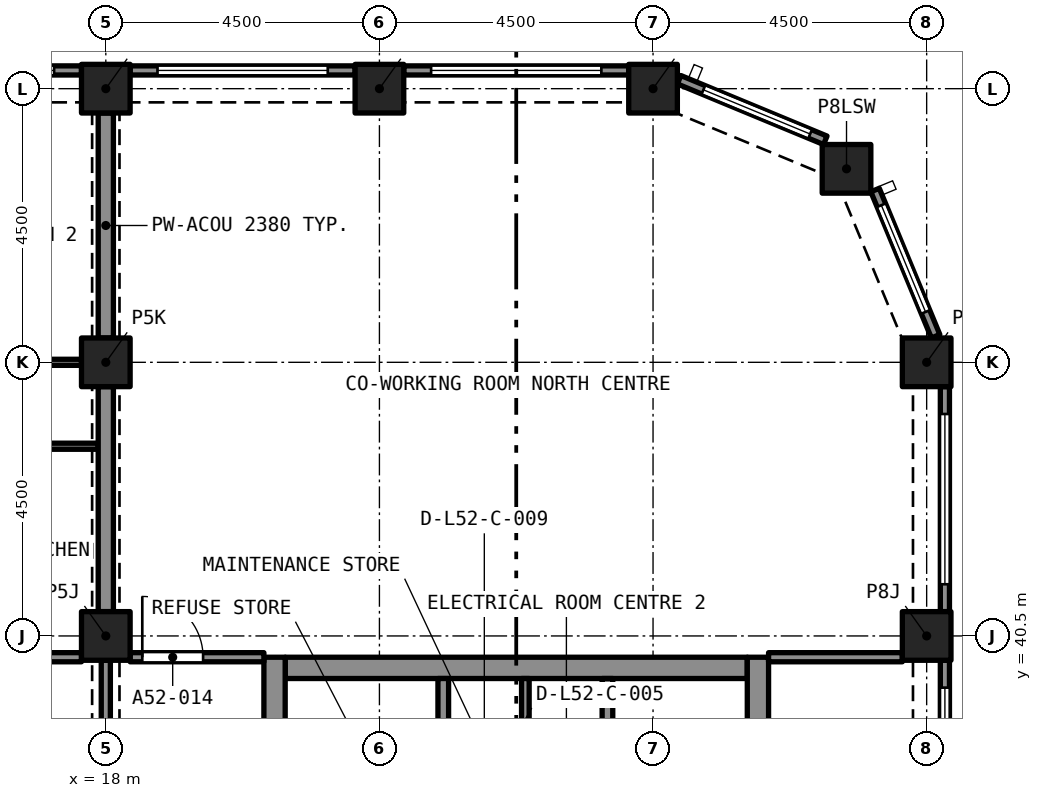
"""IFC4 building model, lengths in metres.
Left out: names, types, materials, properties, quantities, classifications, styles, units other than length and angle.
Written with IfcOpenShell. Run it as: python <this file> out.ifc"""

import sys

from ifc_helpers import new_model, si_unit, direction, frame, frame_2d, origin, origin_2d, place, context, subcontext, project, spatial, rectangle, extrude, element, fill, save


model = new_model("IFC4")
c1 = context("Model", 3, precision=1e-05, world=origin(), true_north=direction((0.0, 1.0)))
c2 = subcontext(c1, "Body", "Model", "MODEL_VIEW")
j1 = project(units=[si_unit("LENGTHUNIT", "METRE"), si_unit("PLANEANGLEUNIT", "RADIAN")], contexts=[c1])
p1 = place(None, origin())
s1 = spatial("IfcSite", under=j1, at=p1, CompositionType="ELEMENT")
p2 = place(p1, origin())
s2 = spatial("IfcBuilding", under=s1, at=p2, CompositionType="ELEMENT")
p3 = place(p2, frame((0.0, 0.0, 189.1)))
s3 = spatial("IfcBuildingStorey", under=s2, at=p3, CompositionType="ELEMENT", Elevation=189.1)
for number, where, z_axis, x_axis in (
    (1, (18.0, 40.5, 0.0), (0.0, 0.0, 1.0), (1.0, 0.0, 0.0)),
    (2, (31.5, 40.5, 0.0), (0.0, 0.0, 1.0), (1.0, 0.0, 0.0)),
    (3, (18.0, 45.0, 0.0), (0.0, 0.0, 1.0), (1.0, 0.0, 0.0)),
    (4, (31.5, 45.0, 0.0), (0.0, 0.0, 1.0), (1.0, 0.0, 0.0)),
    (5, (30.182, 48.182, 0.0), (0.0, 0.0, 1.0), (1.0, 0.0, 0.0)),
    (6, (18.0, 49.5, 0.0), (0.0, 0.0, 1.0), (1.0, 0.0, 0.0)),
    (7, (22.5, 49.5, 0.0), (0.0, 0.0, 1.0), (1.0, 0.0, 0.0)),
    (8, (27.0, 49.5, 0.0), (0.0, 0.0, 1.0), (1.0, 0.0, 0.0)),
):
    element("IfcColumn", number, at=place(p3, frame(where, z_axis=z_axis, x_axis=x_axis)), inside=s3, PredefinedType="COLUMN", context=c2, shape_type="SweptSolid", body=[
        extrude(rectangle(XDim=0.8, YDim=0.8, at=origin_2d()), origin(), (0.0, 0.0, 1.0), 3.2),
    ])
p4 = place(p3, frame((20.95, 39.975, 0.0), z_axis=(0.0, 0.0, 1.0), x_axis=(1.0, 0.0, 0.0)))
e9 = element("IfcWall", 9, at=p4, inside=s3, PredefinedType="SOLIDWALL", context=c2, shape_type="SweptSolid", body=[
    extrude(rectangle(XDim=7.6, YDim=0.35, at=frame_2d((3.8, 0.0))), origin(), (0.0, 0.0, 1.0), 3.2),
])
p5 = place(p3, frame((20.775, 27.35, 0.0), z_axis=(0.0, 0.0, 1.0), x_axis=(0.0, 1.0, 0.0)))
e10 = element("IfcWall", 10, at=p5, inside=s3, PredefinedType="SOLIDWALL", context=c2, shape_type="SweptSolid", body=[
    extrude(rectangle(XDim=12.8, YDim=0.35, at=frame_2d((6.4, 0.0))), origin(), (0.0, 0.0, 1.0), 3.2),
])
p6 = place(p5, frame((8.6, 0.0, 0.0)))
e11 = element("IfcOpeningElement", 11, at=p6, cuts=e10, PredefinedType="OPENING", context=c2, shape_type="SweptSolid", body=[
    extrude(rectangle(XDim=1.2, YDim=2.1, at=frame_2d((0.6, 1.05))), frame((0.0, 0.185, 0.0), z_axis=(0.0, -1.0, 0.0), x_axis=(1.0, 0.0, 0.0)), (0.0, 0.0, 1.0), 0.37),
])
p7 = place(p3, frame((28.725, 27.35, 0.0), z_axis=(0.0, 0.0, 1.0), x_axis=(0.0, 1.0, 0.0)))
e12 = element("IfcWall", 12, at=p7, inside=s3, PredefinedType="SOLIDWALL", context=c2, shape_type="SweptSolid", body=[
    extrude(rectangle(XDim=12.8, YDim=0.35, at=frame_2d((6.4, 0.0))), origin(), (0.0, 0.0, 1.0), 3.2),
])
p8 = place(p7, frame((8.6, 0.0, 0.0)))
e13 = element("IfcOpeningElement", 13, at=p8, cuts=e12, PredefinedType="OPENING", context=c2, shape_type="SweptSolid", body=[
    extrude(rectangle(XDim=1.2, YDim=2.1, at=frame_2d((0.6, 1.05))), frame((0.0, 0.185, 0.0), z_axis=(0.0, -1.0, 0.0), x_axis=(1.0, 0.0, 0.0)), (0.0, 0.0, 1.0), 0.37),
])
p9 = place(p3, frame((31.8, 40.1, 0.0), z_axis=(0.0, 0.0, 1.0), x_axis=(0.0, -1.0, 0.0)))
e14 = element("IfcWall", 14, at=p9, inside=s3, PredefinedType="SOLIDWALL", context=c2, shape_type="SweptSolid", body=[
    extrude(rectangle(XDim=3.7, YDim=0.15, at=frame_2d((1.85, 0.0))), origin(), (0.0, 0.0, 1.0), 3.2),
])
p10 = place(p9, frame((0.45, 0.0, 0.45)))
e15 = element("IfcOpeningElement", 15, at=p10, cuts=e14, PredefinedType="OPENING", context=c2, shape_type="SweptSolid", body=[
    extrude(rectangle(XDim=2.8, YDim=1.95, at=frame_2d((1.4, 0.975))), frame((0.0, 0.085, 0.0), z_axis=(0.0, -1.0, 0.0), x_axis=(1.0, 0.0, 0.0)), (0.0, 0.0, 1.0), 0.17),
])
p11 = place(p3, frame((31.8, 44.6, 0.0), z_axis=(0.0, 0.0, 1.0), x_axis=(0.0, -1.0, 0.0)))
e16 = element("IfcWall", 16, at=p11, inside=s3, PredefinedType="SOLIDWALL", context=c2, shape_type="SweptSolid", body=[
    extrude(rectangle(XDim=3.7, YDim=0.15, at=frame_2d((1.85, 0.0))), origin(), (0.0, 0.0, 1.0), 3.2),
])
p12 = place(p11, frame((0.45, 0.0, 0.45)))
e17 = element("IfcOpeningElement", 17, at=p12, cuts=e16, PredefinedType="OPENING", context=c2, shape_type="SweptSolid", body=[
    extrude(rectangle(XDim=2.8, YDim=1.95, at=frame_2d((1.4, 0.975))), frame((0.0, 0.085, 0.0), z_axis=(0.0, -1.0, 0.0), x_axis=(1.0, 0.0, 0.0)), (0.0, 0.0, 1.0), 0.17),
])
p13 = place(p3, frame((30.651, 47.833, 0.0), z_axis=(0.0, 0.0, 1.0), x_axis=(0.382669406082, -0.923885342263, 0.0)))
e18 = element("IfcWall", 18, at=p13, inside=s3, PredefinedType="SOLIDWALL", context=c2, shape_type="SweptSolid", body=[
    extrude(rectangle(XDim=2.602, YDim=0.15, at=frame_2d((1.301, 0.0))), origin(), (0.0, 0.0, 1.0), 3.2),
])
p14 = place(p13, frame((0.27, 0.0, 0.45)))
e19 = element("IfcOpeningElement", 19, at=p14, cuts=e18, PredefinedType="OPENING", context=c2, shape_type="SweptSolid", body=[
    extrude(rectangle(XDim=1.9, YDim=1.95, at=frame_2d((0.95, 0.975))), frame((0.0, 0.085, 0.0), z_axis=(0.0, -1.0, 0.0), x_axis=(1.0, 0.0, 0.0)), (0.0, 0.0, 1.0), 0.17),
])
p15 = place(p3, frame((27.429, 49.647, 0.0), z_axis=(0.0, 0.0, 1.0), x_axis=(0.923885342263, -0.382669406082, 0.0)))
e20 = element("IfcWall", 20, at=p15, inside=s3, PredefinedType="SOLIDWALL", context=c2, shape_type="SweptSolid", body=[
    extrude(rectangle(XDim=2.602, YDim=0.15, at=frame_2d((1.301, 0.0))), origin(), (0.0, 0.0, 1.0), 3.2),
])
p16 = place(p15, frame((0.432, 0.0, 0.45)))
e21 = element("IfcOpeningElement", 21, at=p16, cuts=e20, PredefinedType="OPENING", context=c2, shape_type="SweptSolid", body=[
    extrude(rectangle(XDim=1.9, YDim=1.95, at=frame_2d((0.95, 0.975))), frame((0.0, 0.085, 0.0), z_axis=(0.0, -1.0, 0.0), x_axis=(1.0, 0.0, 0.0)), (0.0, 0.0, 1.0), 0.17),
])
p17 = place(p3, frame((22.9, 49.8, 0.0), z_axis=(0.0, 0.0, 1.0), x_axis=(1.0, 0.0, 0.0)))
e22 = element("IfcWall", 22, at=p17, inside=s3, PredefinedType="SOLIDWALL", context=c2, shape_type="SweptSolid", body=[
    extrude(rectangle(XDim=3.7, YDim=0.15, at=frame_2d((1.85, 0.0))), origin(), (0.0, 0.0, 1.0), 3.2),
])
p18 = place(p17, frame((0.45, 0.0, 0.45)))
e23 = element("IfcOpeningElement", 23, at=p18, cuts=e22, PredefinedType="OPENING", context=c2, shape_type="SweptSolid", body=[
    extrude(rectangle(XDim=2.8, YDim=1.95, at=frame_2d((1.4, 0.975))), frame((0.0, 0.085, 0.0), z_axis=(0.0, -1.0, 0.0), x_axis=(1.0, 0.0, 0.0)), (0.0, 0.0, 1.0), 0.17),
])
p19 = place(p3, frame((18.4, 49.8, 0.0), z_axis=(0.0, 0.0, 1.0), x_axis=(1.0, 0.0, 0.0)))
e24 = element("IfcWall", 24, at=p19, inside=s3, PredefinedType="SOLIDWALL", context=c2, shape_type="SweptSolid", body=[
    extrude(rectangle(XDim=3.7, YDim=0.15, at=frame_2d((1.85, 0.0))), origin(), (0.0, 0.0, 1.0), 3.2),
])
p20 = place(p19, frame((0.45, 0.0, 0.45)))
e25 = element("IfcOpeningElement", 25, at=p20, cuts=e24, PredefinedType="OPENING", context=c2, shape_type="SweptSolid", body=[
    extrude(rectangle(XDim=2.8, YDim=1.95, at=frame_2d((1.4, 0.975))), frame((0.0, 0.085, 0.0), z_axis=(0.0, -1.0, 0.0), x_axis=(1.0, 0.0, 0.0)), (0.0, 0.0, 1.0), 0.17),
])
p21 = place(p3, frame((13.9, 49.8, 0.0), z_axis=(0.0, 0.0, 1.0), x_axis=(1.0, 0.0, 0.0)))
e26 = element("IfcWall", 26, at=p21, inside=s3, PredefinedType="SOLIDWALL", context=c2, shape_type="SweptSolid", body=[
    extrude(rectangle(XDim=3.7, YDim=0.15, at=frame_2d((1.85, 0.0))), origin(), (0.0, 0.0, 1.0), 3.2),
])
p22 = place(p21, frame((0.45, 0.0, 0.45)))
e27 = element("IfcOpeningElement", 27, at=p22, cuts=e26, PredefinedType="OPENING", context=c2, shape_type="SweptSolid", body=[
    extrude(rectangle(XDim=2.8, YDim=1.95, at=frame_2d((1.4, 0.975))), frame((0.0, 0.085, 0.0), z_axis=(0.0, -1.0, 0.0), x_axis=(1.0, 0.0, 0.0)), (0.0, 0.0, 1.0), 0.17),
])
p23 = place(p3, frame((13.15, 40.15, 0.0), z_axis=(0.0, 0.0, 1.0), x_axis=(1.0, 0.0, 0.0)))
e28 = element("IfcWall", 28, at=p23, inside=s3, PredefinedType="PARTITIONING", context=c2, shape_type="SweptSolid", body=[
    extrude(rectangle(XDim=4.45, YDim=0.15, at=frame_2d((2.225, 0.0))), origin(), (0.0, 0.0, 1.0), 2.9),
])
p24 = place(p3, frame((13.5, 45.0, 0.0), z_axis=(0.0, 0.0, 1.0), x_axis=(1.0, 0.0, 0.0)))
e29 = element("IfcWall", 29, at=p24, inside=s3, PredefinedType="PARTITIONING", context=c2, shape_type="SweptSolid", body=[
    extrude(rectangle(XDim=4.1, YDim=0.1, at=frame_2d((2.05, 0.0))), origin(), (0.0, 0.0, 1.0), 2.9),
])
p25 = place(p24, frame((1.8, 0.0, 0.0)))
e30 = element("IfcOpeningElement", 30, at=p25, cuts=e29, PredefinedType="OPENING", context=c2, shape_type="SweptSolid", body=[
    extrude(rectangle(XDim=0.9, YDim=2.1, at=frame_2d((0.45, 1.05))), frame((0.0, 0.06, 0.0), z_axis=(0.0, -1.0, 0.0), x_axis=(1.0, 0.0, 0.0)), (0.0, 0.0, 1.0), 0.12),
])
p26 = place(p3, frame((18.0, 45.4, 0.0), z_axis=(0.0, 0.0, 1.0), x_axis=(0.0, 1.0, 0.0)))
e31 = element("IfcWall", 31, at=p26, inside=s3, PredefinedType="PARTITIONING", context=c2, shape_type="SweptSolid", body=[
    extrude(rectangle(XDim=3.7, YDim=0.25, at=frame_2d((1.85, 0.0))), origin(), (0.0, 0.0, 1.0), 2.38),
])
p27 = place(p3, frame((17.875, 43.62, 0.0), z_axis=(0.0, 0.0, 1.0), x_axis=(-1.0, 0.0, 0.0)))
e32 = element("IfcWall", 32, at=p27, inside=s3, PredefinedType="PARTITIONING", context=c2, shape_type="SweptSolid", body=[
    extrude(rectangle(XDim=3.525, YDim=0.1, at=frame_2d((1.762, 0.0))), origin(), (0.0, 0.0, 1.0), 2.9),
])
p28 = place(p27, frame((1.25, 0.0, 0.0)))
e33 = element("IfcOpeningElement", 33, at=p28, cuts=e32, PredefinedType="OPENING", context=c2, shape_type="SweptSolid", body=[
    extrude(rectangle(XDim=0.9, YDim=2.1, at=frame_2d((0.45, 1.05))), frame((0.0, 0.06, 0.0), z_axis=(0.0, -1.0, 0.0), x_axis=(1.0, 0.0, 0.0)), (0.0, 0.0, 1.0), 0.12),
])
p29 = place(p3, frame((18.0, 40.9, 0.0), z_axis=(0.0, 0.0, 1.0), x_axis=(0.0, 1.0, 0.0)))
e34 = element("IfcWall", 34, at=p29, inside=s3, PredefinedType="PARTITIONING", context=c2, shape_type="SweptSolid", body=[
    extrude(rectangle(XDim=3.7, YDim=0.25, at=frame_2d((1.85, 0.0))), origin(), (0.0, 0.0, 1.0), 2.38),
])
p30 = place(p3, frame((18.4, 40.15, 0.0), z_axis=(0.0, 0.0, 1.0), x_axis=(1.0, 0.0, 0.0)))
e35 = element("IfcWall", 35, at=p30, inside=s3, PredefinedType="PARTITIONING", context=c2, shape_type="SweptSolid", body=[
    extrude(rectangle(XDim=2.2, YDim=0.15, at=frame_2d((1.1, 0.0))), origin(), (0.0, 0.0, 1.0), 2.75),
])
p31 = place(p30, frame((0.2, 0.0, 0.0)))
e36 = element("IfcOpeningElement", 36, at=p31, cuts=e35, PredefinedType="OPENING", context=c2, shape_type="SweptSolid", body=[
    extrude(rectangle(XDim=1.0, YDim=2.1, at=frame_2d((0.5, 1.05))), frame((0.0, 0.085, 0.0), z_axis=(0.0, -1.0, 0.0), x_axis=(1.0, 0.0, 0.0)), (0.0, 0.0, 1.0), 0.17),
])
p32 = place(p3, frame((28.9, 40.15, 0.0), z_axis=(0.0, 0.0, 1.0), x_axis=(1.0, 0.0, 0.0)))
e37 = element("IfcWall", 37, at=p32, inside=s3, PredefinedType="PARTITIONING", context=c2, shape_type="SweptSolid", body=[
    extrude(rectangle(XDim=2.2, YDim=0.15, at=frame_2d((1.1, 0.0))), origin(), (0.0, 0.0, 1.0), 2.75),
])
p33 = place(p3, frame((18.0, 40.1, 0.0), z_axis=(0.0, 0.0, 1.0), x_axis=(0.0, -1.0, 0.0)))
e38 = element("IfcWall", 38, at=p33, inside=s3, PredefinedType="PARTITIONING", context=c2, shape_type="SweptSolid", body=[
    extrude(rectangle(XDim=3.7, YDim=0.15, at=frame_2d((1.85, 0.0))), origin(), (0.0, 0.0, 1.0), 2.38),
])
p34 = place(p33, frame((1.25, 0.0, 0.0)))
e39 = element("IfcOpeningElement", 39, at=p34, cuts=e38, PredefinedType="OPENING", context=c2, shape_type="SweptSolid", body=[
    extrude(rectangle(XDim=1.2, YDim=2.1, at=frame_2d((0.6, 1.05))), frame((0.0, 0.085, 0.0), z_axis=(0.0, -1.0, 0.0), x_axis=(1.0, 0.0, 0.0)), (0.0, 0.0, 1.0), 0.17),
])
for number, where, z_axis, x_axis in (
    (40, (23.55, 37.5, 0.0), (0.0, 0.0, 1.0), (0.0, 1.0, 0.0)),
    (41, (26.25, 37.5, 0.0), (0.0, 0.0, 1.0), (0.0, 1.0, 0.0)),
):
    element("IfcWall", number, at=place(p3, frame(where, z_axis=z_axis, x_axis=x_axis)), inside=s3, PredefinedType="SOLIDWALL", context=c2, shape_type="SweptSolid", body=[
        extrude(rectangle(XDim=2.3, YDim=0.175, at=frame_2d((1.15, 0.0))), origin(), (0.0, 0.0, 1.0), 2.9),
    ])
p35 = place(p3, frame((24.9, 37.5, 0.0), z_axis=(0.0, 0.0, 1.0), x_axis=(0.0, 1.0, 0.0)))
e42 = element("IfcWall", 42, at=p35, inside=s3, PredefinedType="PARTITIONING", context=c2, shape_type="SweptSolid", body=[
    extrude(rectangle(XDim=2.3, YDim=0.125, at=frame_2d((1.15, 0.0))), origin(), (0.0, 0.0, 1.0), 2.9),
])
p36 = place(p10, origin())
e43 = element("IfcWindow", 43, at=p36, inside=s3, PartitioningType="SINGLE_PANEL", PredefinedType="WINDOW", context=c2, shape_type="SweptSolid", body=[
    extrude(rectangle(XDim=2.8, YDim=1.95, at=frame_2d((1.4, 0.975))), frame((0.0, 0.03, 0.0), z_axis=(0.0, -1.0, 0.0), x_axis=(1.0, 0.0, 0.0)), (0.0, 0.0, 1.0), 0.06),
])
fill(e15, e43)
p37 = place(p12, origin())
e44 = element("IfcWindow", 44, at=p37, inside=s3, PartitioningType="SINGLE_PANEL", PredefinedType="WINDOW", context=c2, shape_type="SweptSolid", body=[
    extrude(rectangle(XDim=2.8, YDim=1.95, at=frame_2d((1.4, 0.975))), frame((0.0, 0.03, 0.0), z_axis=(0.0, -1.0, 0.0), x_axis=(1.0, 0.0, 0.0)), (0.0, 0.0, 1.0), 0.06),
])
fill(e17, e44)
p38 = place(p14, origin())
e45 = element("IfcWindow", 45, at=p38, inside=s3, PartitioningType="SINGLE_PANEL", PredefinedType="WINDOW", context=c2, shape_type="SweptSolid", body=[
    extrude(rectangle(XDim=1.9, YDim=1.95, at=frame_2d((0.95, 0.975))), frame((0.0, 0.03, 0.0), z_axis=(0.0, -1.0, 0.0), x_axis=(1.0, 0.0, 0.0)), (0.0, 0.0, 1.0), 0.06),
])
fill(e19, e45)
p39 = place(p16, origin())
e46 = element("IfcWindow", 46, at=p39, inside=s3, PartitioningType="SINGLE_PANEL", PredefinedType="WINDOW", context=c2, shape_type="SweptSolid", body=[
    extrude(rectangle(XDim=1.9, YDim=1.95, at=frame_2d((0.95, 0.975))), frame((0.0, 0.03, 0.0), z_axis=(0.0, -1.0, 0.0), x_axis=(1.0, 0.0, 0.0)), (0.0, 0.0, 1.0), 0.06),
])
fill(e21, e46)
p40 = place(p18, origin())
e47 = element("IfcWindow", 47, at=p40, inside=s3, PartitioningType="SINGLE_PANEL", PredefinedType="WINDOW", context=c2, shape_type="SweptSolid", body=[
    extrude(rectangle(XDim=2.8, YDim=1.95, at=frame_2d((1.4, 0.975))), frame((0.0, 0.03, 0.0), z_axis=(0.0, -1.0, 0.0), x_axis=(1.0, 0.0, 0.0)), (0.0, 0.0, 1.0), 0.06),
])
fill(e23, e47)
p41 = place(p20, origin())
e48 = element("IfcWindow", 48, at=p41, inside=s3, PartitioningType="SINGLE_PANEL", PredefinedType="WINDOW", context=c2, shape_type="SweptSolid", body=[
    extrude(rectangle(XDim=2.8, YDim=1.95, at=frame_2d((1.4, 0.975))), frame((0.0, 0.03, 0.0), z_axis=(0.0, -1.0, 0.0), x_axis=(1.0, 0.0, 0.0)), (0.0, 0.0, 1.0), 0.06),
])
fill(e25, e48)
p42 = place(p22, origin())
e49 = element("IfcWindow", 49, at=p42, inside=s3, PartitioningType="SINGLE_PANEL", PredefinedType="WINDOW", context=c2, shape_type="SweptSolid", body=[
    extrude(rectangle(XDim=2.8, YDim=1.95, at=frame_2d((1.4, 0.975))), frame((0.0, 0.03, 0.0), z_axis=(0.0, -1.0, 0.0), x_axis=(1.0, 0.0, 0.0)), (0.0, 0.0, 1.0), 0.06),
])
fill(e27, e49)
p43 = place(p31, origin())
e50 = element("IfcDoor", 50, at=p43, inside=s3, OperationType="SINGLE_SWING_LEFT", PredefinedType="DOOR", context=c2, shape_type="SweptSolid", body=[
    extrude(rectangle(XDim=1.0, YDim=2.1, at=frame_2d((0.5, 1.05))), frame((0.0, 0.025, 0.0), z_axis=(0.0, -1.0, 0.0), x_axis=(1.0, 0.0, 0.0)), (0.0, 0.0, 1.0), 0.05),
])
fill(e36, e50)
save(model, sys.argv[1])
